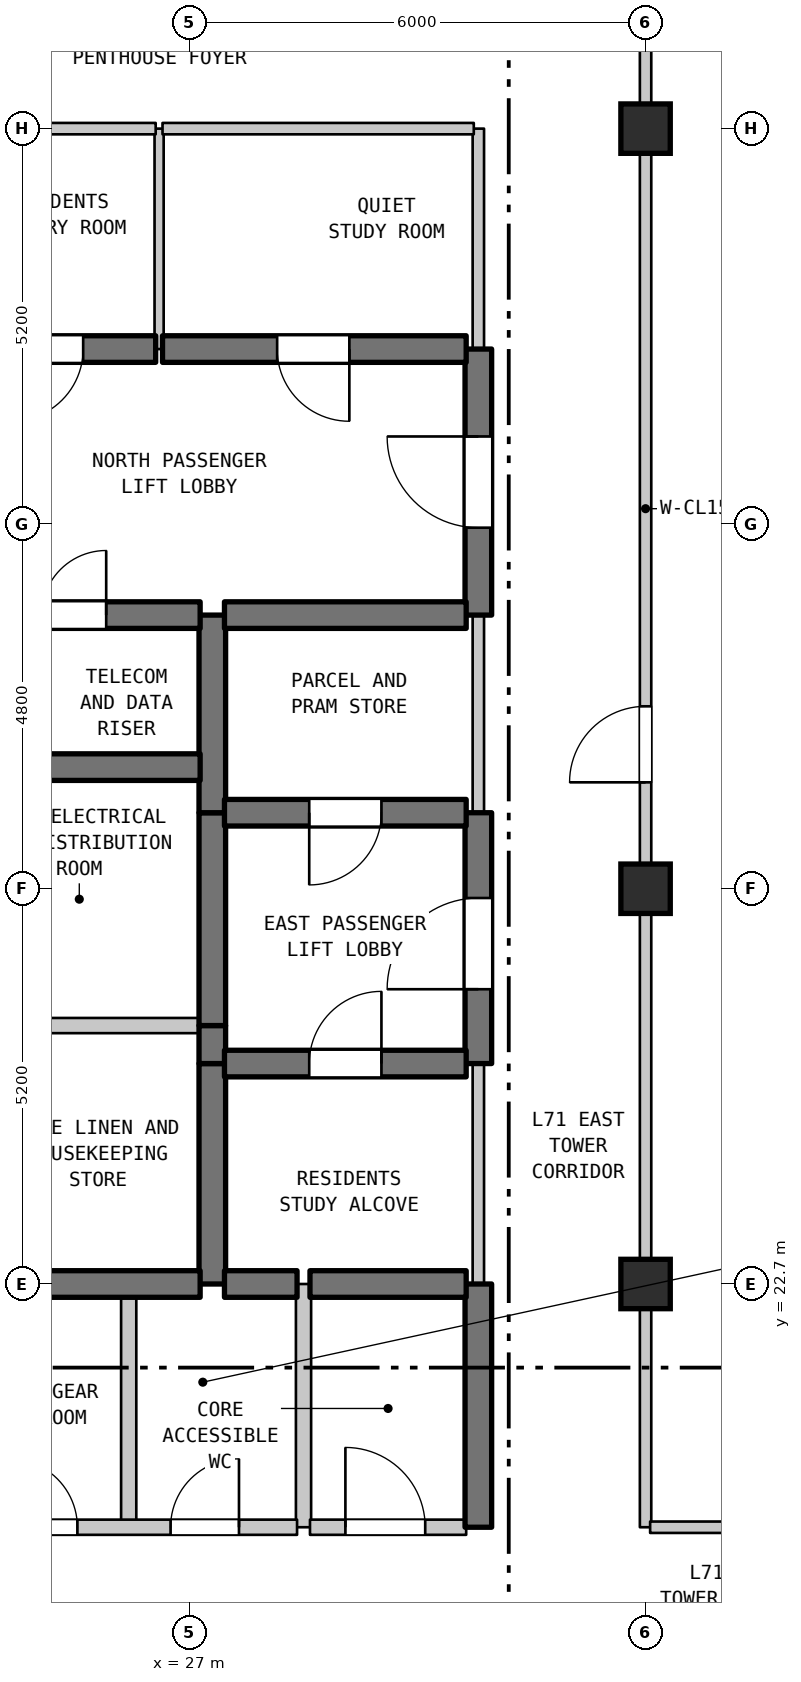
"""IFC4 building model, lengths in metres.
Left out: names, types, materials, properties, quantities, classifications, styles, units other than length and angle.
Written with IfcOpenShell. Run it as: python <this file> out.ifc"""

import sys

from ifc_helpers import new_model, si_unit, direction, frame, frame_2d, origin, origin_2d, place, context, subcontext, project, spatial, rectangle, extrude, element, fill, save


model = new_model("IFC4")
c1 = context("Model", 3, precision=1e-05, world=origin(), true_north=direction((0.0, 1.0)))
c2 = subcontext(c1, "Body", "Model", "MODEL_VIEW")
j1 = project(units=[si_unit("LENGTHUNIT", "METRE"), si_unit("PLANEANGLEUNIT", "RADIAN")], contexts=[c1])
p1 = place(None, origin())
s1 = spatial("IfcSite", under=j1, at=p1, CompositionType="ELEMENT")
p2 = place(p1, origin())
s2 = spatial("IfcBuilding", under=s1, at=p2, CompositionType="ELEMENT")
p3 = place(p2, frame((0.0, 0.0, 284.3)))
s3 = spatial("IfcBuildingStorey", under=s2, at=p3, CompositionType="ELEMENT", Elevation=284.3)
for number, where, z_axis, x_axis in (
    (1, (33.0, 22.7, 0.0), (0.0, 0.0, 1.0), (1.0, 0.0, 0.0)),
    (2, (33.0, 27.9, 0.0), (0.0, 0.0, 1.0), (1.0, 0.0, 0.0)),
    (3, (33.0, 37.9, 0.0), (0.0, 0.0, 1.0), (1.0, 0.0, 0.0)),
):
    element("IfcColumn", number, at=place(p3, frame(where, z_axis=z_axis, x_axis=x_axis)), inside=s3, PredefinedType="COLUMN", context=c2, shape_type="SweptSolid", body=[
        extrude(rectangle(XDim=0.65, YDim=0.65, at=origin_2d()), origin(), (0.0, 0.0, 1.0), 3.7),
    ])
p4 = place(p3, frame((26.2, 19.5, 0.0), z_axis=(0.0, 0.0, 1.0), x_axis=(0.0, 1.0, 0.0)))
e4 = element("IfcWall", 4, at=p4, inside=s3, PredefinedType="STANDARD", context=c2, shape_type="SweptSolid", body=[
    extrude(rectangle(XDim=3.2, YDim=0.2, at=frame_2d((1.6, 0.0))), origin(), (0.0, 0.0, 1.0), 3.39),
])
p5 = place(p3, frame((26.6, 35.0, 0.0), z_axis=(0.0, 0.0, 1.0), x_axis=(0.0, 1.0, 0.0)))
e5 = element("IfcWall", 5, at=p5, inside=s3, PredefinedType="PARTITIONING", context=c2, shape_type="SweptSolid", body=[
    extrude(rectangle(XDim=2.9, YDim=0.12, at=frame_2d((1.45, 0.0))), origin(), (0.0, 0.0, 1.0), 3.39),
])
p6 = place(p3, frame((27.3, 22.7, 0.0), z_axis=(0.0, 0.0, 1.0), x_axis=(0.0, 1.0, 0.0)))
e6 = element("IfcWall", 6, at=p6, inside=s3, PredefinedType="SHEAR", context=c2, shape_type="SweptSolid", body=[
    extrude(rectangle(XDim=2.9, YDim=0.35, at=frame_2d((1.45, 0.0))), origin(), (0.0, 0.0, 1.0), 3.39),
])
p7 = place(p3, frame((27.3, 25.6, 0.0), z_axis=(0.0, 0.0, 1.0), x_axis=(0.0, 1.0, 0.0)))
e7 = element("IfcWall", 7, at=p7, inside=s3, PredefinedType="SHEAR", context=c2, shape_type="SweptSolid", body=[
    extrude(rectangle(XDim=0.5, YDim=0.35, at=frame_2d((0.25, 0.0))), origin(), (0.0, 0.0, 1.0), 3.39),
])
p8 = place(p3, frame((27.3, 26.1, 0.0), z_axis=(0.0, 0.0, 1.0), x_axis=(0.0, 1.0, 0.0)))
e8 = element("IfcWall", 8, at=p8, inside=s3, PredefinedType="SHEAR", context=c2, shape_type="SweptSolid", body=[
    extrude(rectangle(XDim=2.8, YDim=0.35, at=frame_2d((1.4, 0.0))), origin(), (0.0, 0.0, 1.0), 3.39),
])
p9 = place(p3, frame((27.3, 28.9, 0.0), z_axis=(0.0, 0.0, 1.0), x_axis=(0.0, 1.0, 0.0)))
e9 = element("IfcWall", 9, at=p9, inside=s3, PredefinedType="SHEAR", context=c2, shape_type="SweptSolid", body=[
    extrude(rectangle(XDim=2.6, YDim=0.35, at=frame_2d((1.3, 0.0))), origin(), (0.0, 0.0, 1.0), 3.39),
])
p10 = place(p3, frame((28.5, 19.5, 0.0), z_axis=(0.0, 0.0, 1.0), x_axis=(0.0, 1.0, 0.0)))
e10 = element("IfcWall", 10, at=p10, inside=s3, PredefinedType="STANDARD", context=c2, shape_type="SweptSolid", body=[
    extrude(rectangle(XDim=3.2, YDim=0.2, at=frame_2d((1.6, 0.0))), origin(), (0.0, 0.0, 1.0), 3.39),
])
p11 = place(p3, frame((30.8, 19.5, 0.0), z_axis=(0.0, 0.0, 1.0), x_axis=(0.0, 1.0, 0.0)))
e11 = element("IfcWall", 11, at=p11, inside=s3, PredefinedType="SHEAR", context=c2, shape_type="SweptSolid", body=[
    extrude(rectangle(XDim=3.2, YDim=0.35, at=frame_2d((1.6, 0.0))), origin(), (0.0, 0.0, 1.0), 3.39),
])
p12 = place(p3, frame((30.8, 22.7, 0.0), z_axis=(0.0, 0.0, 1.0), x_axis=(0.0, 1.0, 0.0)))
e12 = element("IfcWall", 12, at=p12, inside=s3, PredefinedType="STANDARD", context=c2, shape_type="SweptSolid", body=[
    extrude(rectangle(XDim=2.9, YDim=0.15, at=frame_2d((1.45, 0.0))), origin(), (0.0, 0.0, 1.0), 3.39),
])
p13 = place(p3, frame((30.8, 25.6, 0.0), z_axis=(0.0, 0.0, 1.0), x_axis=(0.0, 1.0, 0.0)))
e13 = element("IfcWall", 13, at=p13, inside=s3, PredefinedType="SHEAR", context=c2, shape_type="SweptSolid", body=[
    extrude(rectangle(XDim=3.3, YDim=0.35, at=frame_2d((1.65, 0.0))), origin(), (0.0, 0.0, 1.0), 3.39),
])
p14 = place(p13, frame((0.978, 0.0, 0.0)))
e14 = element("IfcOpeningElement", 14, at=p14, cuts=e13, PredefinedType="OPENING", context=c2, shape_type="SweptSolid", body=[
    extrude(rectangle(XDim=1.2, YDim=2.2, at=frame_2d((0.6, 1.1))), frame((0.0, 0.185, 0.0), z_axis=(0.0, -1.0, 0.0), x_axis=(1.0, 0.0, 0.0)), (0.0, 0.0, 1.0), 0.37),
])
p15 = place(p3, frame((30.8, 28.9, 0.0), z_axis=(0.0, 0.0, 1.0), x_axis=(0.0, 1.0, 0.0)))
e15 = element("IfcWall", 15, at=p15, inside=s3, PredefinedType="STANDARD", context=c2, shape_type="SweptSolid", body=[
    extrude(rectangle(XDim=2.6, YDim=0.15, at=frame_2d((1.3, 0.0))), origin(), (0.0, 0.0, 1.0), 3.39),
])
p16 = place(p3, frame((30.8, 31.5, 0.0), z_axis=(0.0, 0.0, 1.0), x_axis=(0.0, 1.0, 0.0)))
e16 = element("IfcWall", 16, at=p16, inside=s3, PredefinedType="SHEAR", context=c2, shape_type="SweptSolid", body=[
    extrude(rectangle(XDim=3.5, YDim=0.35, at=frame_2d((1.75, 0.0))), origin(), (0.0, 0.0, 1.0), 3.39),
])
p17 = place(p16, frame((1.15, 0.0, 0.0)))
e17 = element("IfcOpeningElement", 17, at=p17, cuts=e16, PredefinedType="OPENING", context=c2, shape_type="SweptSolid", body=[
    extrude(rectangle(XDim=1.2, YDim=2.2, at=frame_2d((0.6, 1.1))), frame((0.0, 0.185, 0.0), z_axis=(0.0, -1.0, 0.0), x_axis=(1.0, 0.0, 0.0)), (0.0, 0.0, 1.0), 0.37),
])
p18 = place(p3, frame((30.8, 35.0, 0.0), z_axis=(0.0, 0.0, 1.0), x_axis=(0.0, 1.0, 0.0)))
e18 = element("IfcWall", 18, at=p18, inside=s3, PredefinedType="STANDARD", context=c2, shape_type="SweptSolid", body=[
    extrude(rectangle(XDim=2.9, YDim=0.15, at=frame_2d((1.45, 0.0))), origin(), (0.0, 0.0, 1.0), 3.39),
])
p19 = place(p3, frame((33.0, 19.5, 0.0), z_axis=(0.0, 0.0, 1.0), x_axis=(0.0, 1.0, 0.0)))
e19 = element("IfcWall", 19, at=p19, inside=s3, PredefinedType="STANDARD", context=c2, shape_type="SweptSolid", body=[
    extrude(rectangle(XDim=8.4, YDim=0.15, at=frame_2d((4.2, 0.0))), origin(), (0.0, 0.0, 1.0), 3.1),
])
p20 = place(p3, frame((23.96, 19.5, 0.0), z_axis=(0.0, 0.0, 1.0), x_axis=(1.0, 0.0, 0.0)))
e20 = element("IfcWall", 20, at=p20, inside=s3, PredefinedType="STANDARD", context=c2, shape_type="SweptSolid", body=[
    extrude(rectangle(XDim=4.455, YDim=0.2, at=frame_2d((2.228, 0.0))), origin(), (0.0, 0.0, 1.0), 3.39),
])
p21 = place(p20, frame((0.665, 0.0, 0.0)))
e21 = element("IfcOpeningElement", 21, at=p21, cuts=e20, PredefinedType="OPENING", context=c2, shape_type="SweptSolid", body=[
    extrude(rectangle(XDim=0.9, YDim=2.15, at=frame_2d((0.45, 1.075))), frame((0.0, 0.11, 0.0), z_axis=(0.0, -1.0, 0.0), x_axis=(1.0, 0.0, 0.0)), (0.0, 0.0, 1.0), 0.22),
])
p22 = place(p20, frame((2.791, 0.0, 0.0)))
e22 = element("IfcOpeningElement", 22, at=p22, cuts=e20, PredefinedType="OPENING", context=c2, shape_type="SweptSolid", body=[
    extrude(rectangle(XDim=0.9, YDim=2.15, at=frame_2d((0.45, 1.075))), frame((0.0, 0.11, 0.0), z_axis=(0.0, -1.0, 0.0), x_axis=(1.0, 0.0, 0.0)), (0.0, 0.0, 1.0), 0.22),
])
p23 = place(p3, frame((28.585, 19.5, 0.0), z_axis=(0.0, 0.0, 1.0), x_axis=(1.0, 0.0, 0.0)))
e23 = element("IfcWall", 23, at=p23, inside=s3, PredefinedType="STANDARD", context=c2, shape_type="SweptSolid", body=[
    extrude(rectangle(XDim=2.055, YDim=0.2, at=frame_2d((1.027, 0.0))), origin(), (0.0, 0.0, 1.0), 3.39),
])
p24 = place(p23, frame((0.466, 0.0, 0.0)))
e24 = element("IfcOpeningElement", 24, at=p24, cuts=e23, PredefinedType="OPENING", context=c2, shape_type="SweptSolid", body=[
    extrude(rectangle(XDim=1.05, YDim=2.15, at=frame_2d((0.525, 1.075))), frame((0.0, 0.11, 0.0), z_axis=(0.0, -1.0, 0.0), x_axis=(1.0, 0.0, 0.0)), (0.0, 0.0, 1.0), 0.22),
])
p25 = place(p3, frame((33.06, 19.5, 0.0), z_axis=(0.0, 0.0, 1.0), x_axis=(1.0, 0.0, 0.0)))
e25 = element("IfcWall", 25, at=p25, inside=s3, PredefinedType="STANDARD", context=c2, shape_type="SweptSolid", body=[
    extrude(rectangle(XDim=8.323, YDim=0.15, at=frame_2d((4.162, 0.0))), origin(), (0.0, 0.0, 1.0), 3.39),
])
p26 = place(p25, frame((3.583, 0.0, 0.0)))
e26 = element("IfcOpeningElement", 26, at=p26, cuts=e25, PredefinedType="OPENING", context=c2, shape_type="SweptSolid", body=[
    extrude(rectangle(XDim=1.0, YDim=2.15, at=frame_2d((0.5, 1.075))), frame((0.0, 0.085, 0.0), z_axis=(0.0, -1.0, 0.0), x_axis=(1.0, 0.0, 0.0)), (0.0, 0.0, 1.0), 0.17),
])
p27 = place(p3, frame((23.96, 22.7, 0.0), z_axis=(0.0, 0.0, 1.0), x_axis=(1.0, 0.0, 0.0)))
e27 = element("IfcWall", 27, at=p27, inside=s3, PredefinedType="SHEAR", context=c2, shape_type="SweptSolid", body=[
    extrude(rectangle(XDim=3.18, YDim=0.35, at=frame_2d((1.59, 0.0))), origin(), (0.0, 0.0, 1.0), 3.39),
])
p28 = place(p3, frame((27.46, 22.7, 0.0), z_axis=(0.0, 0.0, 1.0), x_axis=(1.0, 0.0, 0.0)))
e28 = element("IfcWall", 28, at=p28, inside=s3, PredefinedType="SHEAR", context=c2, shape_type="SweptSolid", body=[
    extrude(rectangle(XDim=0.955, YDim=0.35, at=frame_2d((0.478, 0.0))), origin(), (0.0, 0.0, 1.0), 3.39),
])
p29 = place(p3, frame((28.585, 22.7, 0.0), z_axis=(0.0, 0.0, 1.0), x_axis=(1.0, 0.0, 0.0)))
e29 = element("IfcWall", 29, at=p29, inside=s3, PredefinedType="SHEAR", context=c2, shape_type="SweptSolid", body=[
    extrude(rectangle(XDim=2.055, YDim=0.35, at=frame_2d((1.027, 0.0))), origin(), (0.0, 0.0, 1.0), 3.39),
])
p30 = place(p3, frame((27.46, 25.6, 0.0), z_axis=(0.0, 0.0, 1.0), x_axis=(1.0, 0.0, 0.0)))
e30 = element("IfcWall", 30, at=p30, inside=s3, PredefinedType="SHEAR", context=c2, shape_type="SweptSolid", body=[
    extrude(rectangle(XDim=3.18, YDim=0.35, at=frame_2d((1.59, 0.0))), origin(), (0.0, 0.0, 1.0), 3.39),
])
p31 = place(p30, frame((1.115, 0.0, 0.0)))
e31 = element("IfcOpeningElement", 31, at=p31, cuts=e30, PredefinedType="OPENING", context=c2, shape_type="SweptSolid", body=[
    extrude(rectangle(XDim=0.95, YDim=2.15, at=frame_2d((0.475, 1.075))), frame((0.0, 0.185, 0.0), z_axis=(0.0, -1.0, 0.0), x_axis=(1.0, 0.0, 0.0)), (0.0, 0.0, 1.0), 0.37),
])
p32 = place(p3, frame((23.96, 26.1, 0.0), z_axis=(0.0, 0.0, 1.0), x_axis=(1.0, 0.0, 0.0)))
e32 = element("IfcWall", 32, at=p32, inside=s3, PredefinedType="STANDARD", context=c2, shape_type="SweptSolid", body=[
    extrude(rectangle(XDim=3.18, YDim=0.2, at=frame_2d((1.59, 0.0))), origin(), (0.0, 0.0, 1.0), 3.39),
])
p33 = place(p3, frame((27.46, 28.9, 0.0), z_axis=(0.0, 0.0, 1.0), x_axis=(1.0, 0.0, 0.0)))
e33 = element("IfcWall", 33, at=p33, inside=s3, PredefinedType="SHEAR", context=c2, shape_type="SweptSolid", body=[
    extrude(rectangle(XDim=3.18, YDim=0.35, at=frame_2d((1.59, 0.0))), origin(), (0.0, 0.0, 1.0), 3.39),
])
p34 = place(p33, frame((1.115, 0.0, 0.0)))
e34 = element("IfcOpeningElement", 34, at=p34, cuts=e33, PredefinedType="OPENING", context=c2, shape_type="SweptSolid", body=[
    extrude(rectangle(XDim=0.95, YDim=2.15, at=frame_2d((0.475, 1.075))), frame((0.0, 0.185, 0.0), z_axis=(0.0, -1.0, 0.0), x_axis=(1.0, 0.0, 0.0)), (0.0, 0.0, 1.0), 0.37),
])
p35 = place(p3, frame((23.96, 29.5, 0.0), z_axis=(0.0, 0.0, 1.0), x_axis=(1.0, 0.0, 0.0)))
e35 = element("IfcWall", 35, at=p35, inside=s3, PredefinedType="SHEAR", context=c2, shape_type="SweptSolid", body=[
    extrude(rectangle(XDim=3.18, YDim=0.35, at=frame_2d((1.59, 0.0))), origin(), (0.0, 0.0, 1.0), 3.39),
])
p36 = place(p3, frame((23.96, 31.5, 0.0), z_axis=(0.0, 0.0, 1.0), x_axis=(1.0, 0.0, 0.0)))
e36 = element("IfcWall", 36, at=p36, inside=s3, PredefinedType="SHEAR", context=c2, shape_type="SweptSolid", body=[
    extrude(rectangle(XDim=3.18, YDim=0.35, at=frame_2d((1.59, 0.0))), origin(), (0.0, 0.0, 1.0), 3.39),
])
p37 = place(p36, frame((1.094, 0.0, 0.0)))
e37 = element("IfcOpeningElement", 37, at=p37, cuts=e36, PredefinedType="OPENING", context=c2, shape_type="SweptSolid", body=[
    extrude(rectangle(XDim=0.85, YDim=2.1, at=frame_2d((0.425, 1.05))), frame((0.0, 0.185, 0.0), z_axis=(0.0, -1.0, 0.0), x_axis=(1.0, 0.0, 0.0)), (0.0, 0.0, 1.0), 0.37),
])
p38 = place(p3, frame((27.46, 31.5, 0.0), z_axis=(0.0, 0.0, 1.0), x_axis=(1.0, 0.0, 0.0)))
e38 = element("IfcWall", 38, at=p38, inside=s3, PredefinedType="SHEAR", context=c2, shape_type="SweptSolid", body=[
    extrude(rectangle(XDim=3.18, YDim=0.35, at=frame_2d((1.59, 0.0))), origin(), (0.0, 0.0, 1.0), 3.39),
])
p39 = place(p3, frame((23.96, 35.0, 0.0), z_axis=(0.0, 0.0, 1.0), x_axis=(1.0, 0.0, 0.0)))
e39 = element("IfcWall", 39, at=p39, inside=s3, PredefinedType="SHEAR", context=c2, shape_type="SweptSolid", body=[
    extrude(rectangle(XDim=2.595, YDim=0.35, at=frame_2d((1.297, 0.0))), origin(), (0.0, 0.0, 1.0), 3.39),
])
p40 = place(p39, frame((0.691, 0.0, 0.0)))
e40 = element("IfcOpeningElement", 40, at=p40, cuts=e39, PredefinedType="OPENING", context=c2, shape_type="SweptSolid", body=[
    extrude(rectangle(XDim=0.95, YDim=2.15, at=frame_2d((0.475, 1.075))), frame((0.0, 0.185, 0.0), z_axis=(0.0, -1.0, 0.0), x_axis=(1.0, 0.0, 0.0)), (0.0, 0.0, 1.0), 0.37),
])
p41 = place(p3, frame((26.645, 35.0, 0.0), z_axis=(0.0, 0.0, 1.0), x_axis=(1.0, 0.0, 0.0)))
e41 = element("IfcWall", 41, at=p41, inside=s3, PredefinedType="SHEAR", context=c2, shape_type="SweptSolid", body=[
    extrude(rectangle(XDim=3.995, YDim=0.35, at=frame_2d((1.998, 0.0))), origin(), (0.0, 0.0, 1.0), 3.39),
])
p42 = place(p41, frame((1.508, 0.0, 0.0)))
e42 = element("IfcOpeningElement", 42, at=p42, cuts=e41, PredefinedType="OPENING", context=c2, shape_type="SweptSolid", body=[
    extrude(rectangle(XDim=0.95, YDim=2.15, at=frame_2d((0.475, 1.075))), frame((0.0, 0.185, 0.0), z_axis=(0.0, -1.0, 0.0), x_axis=(1.0, 0.0, 0.0)), (0.0, 0.0, 1.0), 0.37),
])
p43 = place(p3, frame((23.96, 37.9, 0.0), z_axis=(0.0, 0.0, 1.0), x_axis=(1.0, 0.0, 0.0)))
e43 = element("IfcWall", 43, at=p43, inside=s3, PredefinedType="STANDARD", context=c2, shape_type="SweptSolid", body=[
    extrude(rectangle(XDim=2.595, YDim=0.15, at=frame_2d((1.297, 0.0))), origin(), (0.0, 0.0, 1.0), 2.89),
])
p44 = place(p3, frame((26.645, 37.9, 0.0), z_axis=(0.0, 0.0, 1.0), x_axis=(1.0, 0.0, 0.0)))
e44 = element("IfcWall", 44, at=p44, inside=s3, PredefinedType="STANDARD", context=c2, shape_type="SweptSolid", body=[
    extrude(rectangle(XDim=4.095, YDim=0.15, at=frame_2d((2.047, 0.0))), origin(), (0.0, 0.0, 1.0), 2.89),
])
p45 = place(p3, frame((33.0, 27.9, 0.0), z_axis=(0.0, 0.0, 1.0), x_axis=(0.0, 1.0, 0.0)))
e45 = element("IfcWall", 45, at=p45, inside=s3, PredefinedType="STANDARD", context=c2, shape_type="SweptSolid", body=[
    extrude(rectangle(XDim=10.0, YDim=0.15, at=frame_2d((5.0, 0.0))), origin(), (0.0, 0.0, 1.0), 2.89),
])
p46 = place(p45, frame((1.4, 0.0, 0.0)))
e46 = element("IfcOpeningElement", 46, at=p46, cuts=e45, PredefinedType="OPENING", context=c2, shape_type="SweptSolid", body=[
    extrude(rectangle(XDim=1.0, YDim=2.15, at=frame_2d((0.5, 1.075))), frame((0.0, 0.085, 0.0), z_axis=(0.0, -1.0, 0.0), x_axis=(1.0, 0.0, 0.0)), (0.0, 0.0, 1.0), 0.17),
])
p47 = place(p3, frame((33.0, 37.9, 0.0), z_axis=(0.0, 0.0, 1.0), x_axis=(0.0, 1.0, 0.0)))
e47 = element("IfcWall", 47, at=p47, inside=s3, PredefinedType="STANDARD", context=c2, shape_type="SweptSolid", body=[
    extrude(rectangle(XDim=2.2, YDim=0.15, at=frame_2d((1.1, 0.0))), origin(), (0.0, 0.0, 1.0), 2.79),
])
p48 = place(p14, origin())
e48 = element("IfcDoor", 48, at=p48, inside=s3, OperationType="SINGLE_SWING_LEFT", PredefinedType="DOOR", context=c2, shape_type="SweptSolid", body=[
    extrude(rectangle(XDim=1.2, YDim=2.2, at=frame_2d((0.6, 1.1))), frame((0.0, 0.025, 0.0), z_axis=(0.0, -1.0, 0.0), x_axis=(1.0, 0.0, 0.0)), (0.0, 0.0, 1.0), 0.05),
])
fill(e14, e48)
p49 = place(p17, origin())
e49 = element("IfcDoor", 49, at=p49, inside=s3, OperationType="SINGLE_SWING_RIGHT", PredefinedType="DOOR", context=c2, shape_type="SweptSolid", body=[
    extrude(rectangle(XDim=1.2, YDim=2.2, at=frame_2d((0.6, 1.1))), frame((0.0, 0.025, 0.0), z_axis=(0.0, -1.0, 0.0), x_axis=(1.0, 0.0, 0.0)), (0.0, 0.0, 1.0), 0.05),
])
fill(e17, e49)
p50 = place(p46, origin())
e50 = element("IfcDoor", 50, at=p50, inside=s3, OperationType="SINGLE_SWING_LEFT", PredefinedType="DOOR", context=c2, shape_type="SweptSolid", body=[
    extrude(rectangle(XDim=1.0, YDim=2.15, at=frame_2d((0.5, 1.075))), frame((0.0, 0.025, 0.0), z_axis=(0.0, -1.0, 0.0), x_axis=(1.0, 0.0, 0.0)), (0.0, 0.0, 1.0), 0.05),
])
fill(e46, e50)
p51 = place(p21, origin())
e51 = element("IfcDoor", 51, at=p51, inside=s3, OperationType="SINGLE_SWING_LEFT", PredefinedType="DOOR", context=c2, shape_type="SweptSolid", body=[
    extrude(rectangle(XDim=0.9, YDim=2.15, at=frame_2d((0.45, 1.075))), frame((0.0, 0.025, 0.0), z_axis=(0.0, -1.0, 0.0), x_axis=(1.0, 0.0, 0.0)), (0.0, 0.0, 1.0), 0.05),
])
fill(e21, e51)
p52 = place(p22, origin())
e52 = element("IfcDoor", 52, at=p52, inside=s3, OperationType="SINGLE_SWING_RIGHT", PredefinedType="DOOR", context=c2, shape_type="SweptSolid", body=[
    extrude(rectangle(XDim=0.9, YDim=2.15, at=frame_2d((0.45, 1.075))), frame((0.0, 0.025, 0.0), z_axis=(0.0, -1.0, 0.0), x_axis=(1.0, 0.0, 0.0)), (0.0, 0.0, 1.0), 0.05),
])
fill(e22, e52)
p53 = place(p24, origin())
e53 = element("IfcDoor", 53, at=p53, inside=s3, OperationType="SINGLE_SWING_LEFT", PredefinedType="DOOR", context=c2, shape_type="SweptSolid", body=[
    extrude(rectangle(XDim=1.05, YDim=2.15, at=frame_2d((0.525, 1.075))), frame((0.0, 0.025, 0.0), z_axis=(0.0, -1.0, 0.0), x_axis=(1.0, 0.0, 0.0)), (0.0, 0.0, 1.0), 0.05),
])
fill(e24, e53)
p54 = place(p31, origin())
e54 = element("IfcDoor", 54, at=p54, inside=s3, OperationType="SINGLE_SWING_RIGHT", PredefinedType="DOOR", context=c2, shape_type="SweptSolid", body=[
    extrude(rectangle(XDim=0.95, YDim=2.15, at=frame_2d((0.475, 1.075))), frame((0.0, 0.025, 0.0), z_axis=(0.0, -1.0, 0.0), x_axis=(1.0, 0.0, 0.0)), (0.0, 0.0, 1.0), 0.05),
])
fill(e31, e54)
p55 = place(p34, frame((0.95, 0.0, 0.0), z_axis=(0.0, 0.0, 1.0), x_axis=(-1.0, 0.0, 0.0)))
e55 = element("IfcDoor", 55, at=p55, inside=s3, OperationType="SINGLE_SWING_LEFT", PredefinedType="DOOR", context=c2, shape_type="SweptSolid", body=[
    extrude(rectangle(XDim=0.95, YDim=2.15, at=frame_2d((0.475, 1.075))), frame((0.0, 0.025, 0.0), z_axis=(0.0, -1.0, 0.0), x_axis=(1.0, 0.0, 0.0)), (0.0, 0.0, 1.0), 0.05),
])
fill(e34, e55)
p56 = place(p37, origin())
e56 = element("IfcDoor", 56, at=p56, inside=s3, OperationType="SINGLE_SWING_RIGHT", PredefinedType="DOOR", context=c2, shape_type="SweptSolid", body=[
    extrude(rectangle(XDim=0.85, YDim=2.1, at=frame_2d((0.425, 1.05))), frame((0.0, 0.025, 0.0), z_axis=(0.0, -1.0, 0.0), x_axis=(1.0, 0.0, 0.0)), (0.0, 0.0, 1.0), 0.05),
])
fill(e37, e56)
p57 = place(p40, frame((0.95, 0.0, 0.0), z_axis=(0.0, 0.0, 1.0), x_axis=(-1.0, 0.0, 0.0)))
e57 = element("IfcDoor", 57, at=p57, inside=s3, OperationType="SINGLE_SWING_LEFT", PredefinedType="DOOR", context=c2, shape_type="SweptSolid", body=[
    extrude(rectangle(XDim=0.95, YDim=2.15, at=frame_2d((0.475, 1.075))), frame((0.0, 0.025, 0.0), z_axis=(0.0, -1.0, 0.0), x_axis=(1.0, 0.0, 0.0)), (0.0, 0.0, 1.0), 0.05),
])
fill(e40, e57)
p58 = place(p42, frame((0.95, 0.0, 0.0), z_axis=(0.0, 0.0, 1.0), x_axis=(-1.0, 0.0, 0.0)))
e58 = element("IfcDoor", 58, at=p58, inside=s3, OperationType="SINGLE_SWING_RIGHT", PredefinedType="DOOR", context=c2, shape_type="SweptSolid", body=[
    extrude(rectangle(XDim=0.95, YDim=2.15, at=frame_2d((0.475, 1.075))), frame((0.0, 0.025, 0.0), z_axis=(0.0, -1.0, 0.0), x_axis=(1.0, 0.0, 0.0)), (0.0, 0.0, 1.0), 0.05),
])
fill(e42, e58)
save(model, sys.argv[1])
